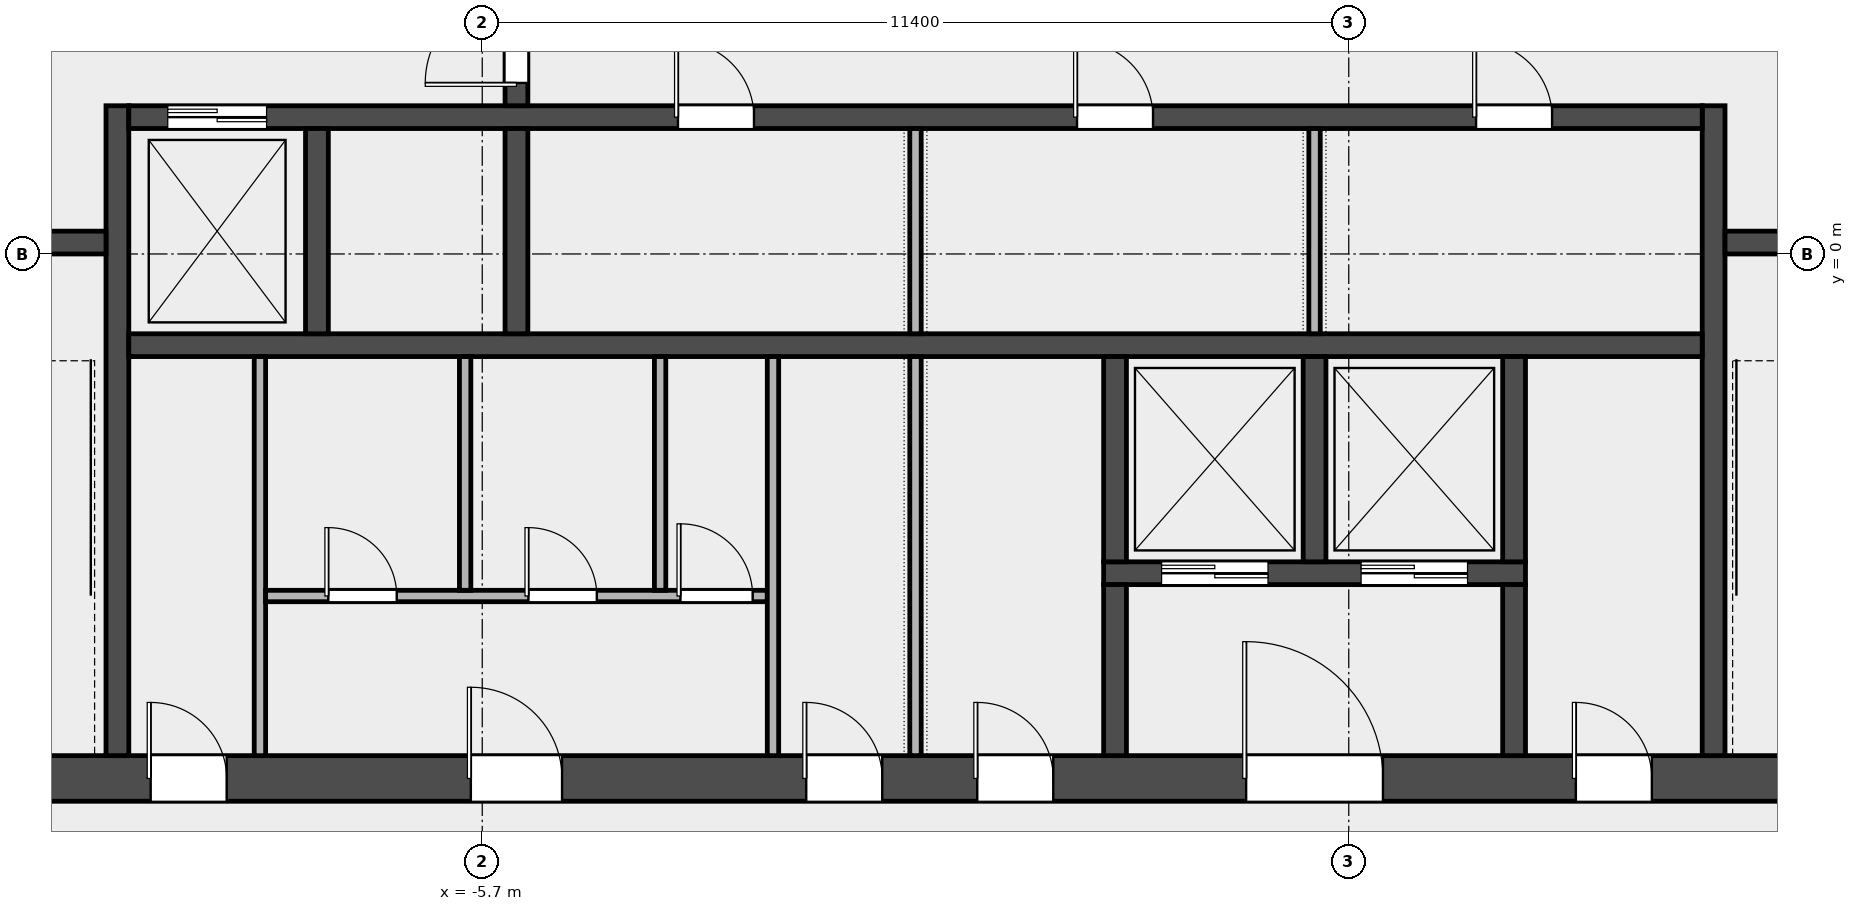
"""IFC4 building model, lengths in metres.
Left out: names, types, materials, properties, quantities, classifications, styles, units other than length and angle.
Written with IfcOpenShell. Run it as: python <this file> out.ifc"""

import sys

from ifc_helpers import new_model, si_unit, direction, frame, frame_2d, origin, place, context, subcontext, project, spatial, rectangle, extrude, element, fill, save


model = new_model("IFC4")
c1 = context("Model", 3, precision=1e-05, world=origin(), true_north=direction((0.0, 1.0)))
c2 = subcontext(c1, "Body", "Model", "MODEL_VIEW")
j1 = project(units=[si_unit("LENGTHUNIT", "METRE"), si_unit("PLANEANGLEUNIT", "RADIAN")], contexts=[c1])
p1 = place(None, origin())
s1 = spatial("IfcSite", under=j1, at=p1, CompositionType="ELEMENT")
p2 = place(p1, origin())
s2 = spatial("IfcBuilding", under=s1, at=p2, CompositionType="ELEMENT")
p3 = place(p2, frame((0.0, 0.0, 275.4)))
s3 = spatial("IfcBuildingStorey", under=s2, at=p3, CompositionType="ELEMENT", Elevation=275.4)
p4 = place(p3, frame((-14.4, -6.9, 0.0), z_axis=(0.0, 0.0, 1.0), x_axis=(1.0, 0.0, 0.0)))
e1 = element("IfcWall", 1, at=p4, inside=s3, PredefinedType="SHEAR", context=c2, shape_type="SweptSolid", body=[
    extrude(rectangle(XDim=28.8, YDim=0.6, at=frame_2d((14.4, 0.0))), origin(), (0.0, 0.0, 1.0), 3.7),
])
p5 = place(p4, frame((4.337, 0.0, 0.0)))
e2 = element("IfcOpeningElement", 2, at=p5, cuts=e1, PredefinedType="OPENING", context=c2, shape_type="SweptSolid", body=[
    extrude(rectangle(XDim=1.0, YDim=2.1, at=frame_2d((0.5, 1.05))), frame((0.0, 0.312, 0.0), z_axis=(0.0, -1.0, 0.0), x_axis=(1.0, 0.0, 0.0)), (0.0, 0.0, 1.0), 0.624),
])
p6 = place(p4, frame((8.55, 0.0, 0.0)))
e3 = element("IfcOpeningElement", 3, at=p6, cuts=e1, PredefinedType="OPENING", context=c2, shape_type="SweptSolid", body=[
    extrude(rectangle(XDim=1.2, YDim=2.1, at=frame_2d((0.6, 1.05))), frame((0.0, 0.312, 0.0), z_axis=(0.0, -1.0, 0.0), x_axis=(1.0, 0.0, 0.0)), (0.0, 0.0, 1.0), 0.624),
])
p7 = place(p4, frame((12.962, 0.0, 0.0)))
e4 = element("IfcOpeningElement", 4, at=p7, cuts=e1, PredefinedType="OPENING", context=c2, shape_type="SweptSolid", body=[
    extrude(rectangle(XDim=1.0, YDim=2.1, at=frame_2d((0.5, 1.05))), frame((0.0, 0.312, 0.0), z_axis=(0.0, -1.0, 0.0), x_axis=(1.0, 0.0, 0.0)), (0.0, 0.0, 1.0), 0.624),
])
p8 = place(p4, frame((15.212, 0.0, 0.0)))
e5 = element("IfcOpeningElement", 5, at=p8, cuts=e1, PredefinedType="OPENING", context=c2, shape_type="SweptSolid", body=[
    extrude(rectangle(XDim=1.0, YDim=2.1, at=frame_2d((0.5, 1.05))), frame((0.0, 0.312, 0.0), z_axis=(0.0, -1.0, 0.0), x_axis=(1.0, 0.0, 0.0)), (0.0, 0.0, 1.0), 0.624),
])
p9 = place(p4, frame((18.75, 0.0, 0.0)))
e6 = element("IfcOpeningElement", 6, at=p9, cuts=e1, PredefinedType="OPENING", context=c2, shape_type="SweptSolid", body=[
    extrude(rectangle(XDim=1.8, YDim=2.1, at=frame_2d((0.9, 1.05))), frame((0.0, 0.312, 0.0), z_axis=(0.0, -1.0, 0.0), x_axis=(1.0, 0.0, 0.0)), (0.0, 0.0, 1.0), 0.624),
])
p10 = place(p4, frame((23.087, 0.0, 0.0)))
e7 = element("IfcOpeningElement", 7, at=p10, cuts=e1, PredefinedType="OPENING", context=c2, shape_type="SweptSolid", body=[
    extrude(rectangle(XDim=1.0, YDim=2.1, at=frame_2d((0.5, 1.05))), frame((0.0, 0.312, 0.0), z_axis=(0.0, -1.0, 0.0), x_axis=(1.0, 0.0, 0.0)), (0.0, 0.0, 1.0), 0.624),
])
for number, where, z_axis, x_axis in (
    (8, (-10.5, -6.6, 0.0), (0.0, 0.0, 1.0), (0.0, 1.0, 0.0)),
    (9, (10.5, -6.6, 0.0), (0.0, 0.0, 1.0), (0.0, 1.0, 0.0)),
):
    element("IfcWall", number, at=place(p3, frame(where, z_axis=z_axis, x_axis=x_axis)), inside=s3, PredefinedType="SHEAR", context=c2, shape_type="SweptSolid", body=[
        extrude(rectangle(XDim=8.55, YDim=0.3, at=frame_2d((4.275, 0.0))), origin(), (0.0, 0.0, 1.0), 3.7),
    ])
p11 = place(p3, frame((-13.8, 0.15, 0.0), z_axis=(0.0, 0.0, 1.0), x_axis=(1.0, 0.0, 0.0)))
e10 = element("IfcWall", 10, at=p11, inside=s3, PredefinedType="SOLIDWALL", context=c2, shape_type="SweptSolid", body=[
    extrude(rectangle(XDim=3.15, YDim=0.3, at=frame_2d((1.575, 0.0))), origin(), (0.0, 0.0, 1.0), 3.7),
])
p12 = place(p11, frame((0.975, 0.0, 0.0)))
e11 = element("IfcOpeningElement", 11, at=p12, cuts=e10, PredefinedType="OPENING", context=c2, shape_type="SweptSolid", body=[
    extrude(rectangle(XDim=1.1, YDim=2.1, at=frame_2d((0.55, 1.05))), frame((0.0, 0.162, 0.0), z_axis=(0.0, -1.0, 0.0), x_axis=(1.0, 0.0, 0.0)), (0.0, 0.0, 1.0), 0.324),
])
p13 = place(p3, frame((10.65, 0.15, 0.0), z_axis=(0.0, 0.0, 1.0), x_axis=(1.0, 0.0, 0.0)))
e12 = element("IfcWall", 12, at=p13, inside=s3, PredefinedType="SOLIDWALL", context=c2, shape_type="SweptSolid", body=[
    extrude(rectangle(XDim=3.15, YDim=0.3, at=frame_2d((1.575, 0.0))), origin(), (0.0, 0.0, 1.0), 3.7),
])
p14 = place(p13, frame((1.025, 0.0, 0.0)))
e13 = element("IfcOpeningElement", 13, at=p14, cuts=e12, PredefinedType="OPENING", context=c2, shape_type="SweptSolid", body=[
    extrude(rectangle(XDim=1.1, YDim=2.1, at=frame_2d((0.55, 1.05))), frame((0.0, 0.162, 0.0), z_axis=(0.0, -1.0, 0.0), x_axis=(1.0, 0.0, 0.0)), (0.0, 0.0, 1.0), 0.324),
])
p15 = place(p3, frame((-10.35, -1.2, 0.0), z_axis=(0.0, 0.0, 1.0), x_axis=(1.0, 0.0, 0.0)))
e14 = element("IfcWall", 14, at=p15, inside=s3, PredefinedType="SOLIDWALL", context=c2, shape_type="SweptSolid", body=[
    extrude(rectangle(XDim=20.7, YDim=0.3, at=frame_2d((10.35, 0.0))), origin(), (0.0, 0.0, 1.0), 3.7),
])
p16 = place(p3, frame((-10.35, 1.8, 0.0), z_axis=(0.0, 0.0, 1.0), x_axis=(1.0, 0.0, 0.0)))
e15 = element("IfcWall", 15, at=p16, inside=s3, PredefinedType="SOLIDWALL", context=c2, shape_type="SweptSolid", body=[
    extrude(rectangle(XDim=20.7, YDim=0.3, at=frame_2d((10.35, 0.0))), origin(), (0.0, 0.0, 1.0), 3.7),
])
p17 = place(p16, frame((0.512, 0.0, 0.0)))
e16 = element("IfcOpeningElement", 16, at=p17, cuts=e15, PredefinedType="OPENING", context=c2, shape_type="SweptSolid", body=[
    extrude(rectangle(XDim=1.3, YDim=2.1, at=frame_2d((0.65, 1.05))), frame((0.0, 0.162, 0.0), z_axis=(0.0, -1.0, 0.0), x_axis=(1.0, 0.0, 0.0)), (0.0, 0.0, 1.0), 0.324),
])
p18 = place(p16, frame((7.225, 0.0, 0.0)))
e17 = element("IfcOpeningElement", 17, at=p18, cuts=e15, PredefinedType="OPENING", context=c2, shape_type="SweptSolid", body=[
    extrude(rectangle(XDim=1.0, YDim=2.1, at=frame_2d((0.5, 1.05))), frame((0.0, 0.162, 0.0), z_axis=(0.0, -1.0, 0.0), x_axis=(1.0, 0.0, 0.0)), (0.0, 0.0, 1.0), 0.324),
])
p19 = place(p16, frame((12.475, 0.0, 0.0)))
e18 = element("IfcOpeningElement", 18, at=p19, cuts=e15, PredefinedType="OPENING", context=c2, shape_type="SweptSolid", body=[
    extrude(rectangle(XDim=1.0, YDim=2.1, at=frame_2d((0.5, 1.05))), frame((0.0, 0.162, 0.0), z_axis=(0.0, -1.0, 0.0), x_axis=(1.0, 0.0, 0.0)), (0.0, 0.0, 1.0), 0.324),
])
p20 = place(p16, frame((17.725, 0.0, 0.0)))
e19 = element("IfcOpeningElement", 19, at=p20, cuts=e15, PredefinedType="OPENING", context=c2, shape_type="SweptSolid", body=[
    extrude(rectangle(XDim=1.0, YDim=2.1, at=frame_2d((0.5, 1.05))), frame((0.0, 0.162, 0.0), z_axis=(0.0, -1.0, 0.0), x_axis=(1.0, 0.0, 0.0)), (0.0, 0.0, 1.0), 0.324),
])
for number, where, z_axis, x_axis in (
    (20, (-7.875, -1.05, 0.0), (0.0, 0.0, 1.0), (0.0, 1.0, 0.0)),
    (21, (-5.25, -1.05, 0.0), (0.0, 0.0, 1.0), (0.0, 1.0, 0.0)),
):
    element("IfcWall", number, at=place(p3, frame(where, z_axis=z_axis, x_axis=x_axis)), inside=s3, PredefinedType="SOLIDWALL", context=c2, shape_type="SweptSolid", body=[
        extrude(rectangle(XDim=2.7, YDim=0.3, at=frame_2d((1.35, 0.0))), origin(), (0.0, 0.0, 1.0), 3.7),
    ])
p21 = place(p3, frame((-5.25, 1.95, 0.0), z_axis=(0.0, 0.0, 1.0), x_axis=(0.0, 1.0, 0.0)))
e22 = element("IfcWall", 22, at=p21, inside=s3, PredefinedType="SOLIDWALL", context=c2, shape_type="SweptSolid", body=[
    extrude(rectangle(XDim=3.3, YDim=0.3, at=frame_2d((1.65, 0.0))), origin(), (0.0, 0.0, 1.0), 3.7),
])
p22 = place(p21, frame((0.3, 0.0, 0.0)))
e23 = element("IfcOpeningElement", 23, at=p22, cuts=e22, PredefinedType="OPENING", context=c2, shape_type="SweptSolid", body=[
    extrude(rectangle(XDim=1.2, YDim=2.1, at=frame_2d((0.6, 1.05))), frame((0.0, 0.162, 0.0), z_axis=(0.0, -1.0, 0.0), x_axis=(1.0, 0.0, 0.0)), (0.0, 0.0, 1.0), 0.324),
])
p23 = place(p21, frame((1.8, 0.0, 0.0)))
e24 = element("IfcOpeningElement", 24, at=p23, cuts=e22, PredefinedType="OPENING", context=c2, shape_type="SweptSolid", body=[
    extrude(rectangle(XDim=1.2, YDim=2.1, at=frame_2d((0.6, 1.05))), frame((0.0, 0.162, 0.0), z_axis=(0.0, -1.0, 0.0), x_axis=(1.0, 0.0, 0.0)), (0.0, 0.0, 1.0), 0.324),
])
p24 = place(p3, frame((2.475, -4.2, 0.0), z_axis=(0.0, 0.0, 1.0), x_axis=(1.0, 0.0, 0.0)))
e25 = element("IfcWall", 25, at=p24, inside=s3, PredefinedType="SOLIDWALL", context=c2, shape_type="SweptSolid", body=[
    extrude(rectangle(XDim=5.55, YDim=0.3, at=frame_2d((2.775, 0.0))), origin(), (0.0, 0.0, 1.0), 3.7),
])
p25 = place(p24, frame((0.762, 0.0, 0.0)))
e26 = element("IfcOpeningElement", 26, at=p25, cuts=e25, PredefinedType="OPENING", context=c2, shape_type="SweptSolid", body=[
    extrude(rectangle(XDim=1.4, YDim=2.1, at=frame_2d((0.7, 1.05))), frame((0.0, 0.162, 0.0), z_axis=(0.0, -1.0, 0.0), x_axis=(1.0, 0.0, 0.0)), (0.0, 0.0, 1.0), 0.324),
])
p26 = place(p24, frame((3.387, 0.0, 0.0)))
e27 = element("IfcOpeningElement", 27, at=p26, cuts=e25, PredefinedType="OPENING", context=c2, shape_type="SweptSolid", body=[
    extrude(rectangle(XDim=1.4, YDim=2.1, at=frame_2d((0.7, 1.05))), frame((0.0, 0.162, 0.0), z_axis=(0.0, -1.0, 0.0), x_axis=(1.0, 0.0, 0.0)), (0.0, 0.0, 1.0), 0.324),
])
p27 = place(p3, frame((2.625, -4.05, 0.0), z_axis=(0.0, 0.0, 1.0), x_axis=(0.0, 1.0, 0.0)))
e28 = element("IfcWall", 28, at=p27, inside=s3, PredefinedType="SOLIDWALL", context=c2, shape_type="SweptSolid", body=[
    extrude(rectangle(XDim=2.7, YDim=0.3, at=frame_2d((1.35, 0.0))), origin(), (0.0, 0.0, 1.0), 3.7),
])
p28 = place(p3, frame((2.625, -6.6, 0.0), z_axis=(0.0, 0.0, 1.0), x_axis=(0.0, 1.0, 0.0)))
e29 = element("IfcWall", 29, at=p28, inside=s3, PredefinedType="SOLIDWALL", context=c2, shape_type="SweptSolid", body=[
    extrude(rectangle(XDim=2.25, YDim=0.3, at=frame_2d((1.125, 0.0))), origin(), (0.0, 0.0, 1.0), 3.7),
])
for number, where, z_axis, x_axis in (
    (30, (5.25, -4.05, 0.0), (0.0, 0.0, 1.0), (0.0, 1.0, 0.0)),
    (31, (7.875, -4.05, 0.0), (0.0, 0.0, 1.0), (0.0, 1.0, 0.0)),
):
    element("IfcWall", number, at=place(p3, frame(where, z_axis=z_axis, x_axis=x_axis)), inside=s3, PredefinedType="SOLIDWALL", context=c2, shape_type="SweptSolid", body=[
        extrude(rectangle(XDim=2.7, YDim=0.3, at=frame_2d((1.35, 0.0))), origin(), (0.0, 0.0, 1.0), 3.7),
    ])
p29 = place(p3, frame((7.875, -6.6, 0.0), z_axis=(0.0, 0.0, 1.0), x_axis=(0.0, 1.0, 0.0)))
e32 = element("IfcWall", 32, at=p29, inside=s3, PredefinedType="SOLIDWALL", context=c2, shape_type="SweptSolid", body=[
    extrude(rectangle(XDim=2.25, YDim=0.3, at=frame_2d((1.125, 0.0))), origin(), (0.0, 0.0, 1.0), 3.7),
])
p30 = place(p3, frame((-8.625, -6.6, 0.0), z_axis=(0.0, 0.0, 1.0), x_axis=(0.0, 1.0, 0.0)))
e33 = element("IfcWall", 33, at=p30, inside=s3, PredefinedType="PARTITIONING", context=c2, shape_type="SweptSolid", body=[
    extrude(rectangle(XDim=5.25, YDim=0.15, at=frame_2d((2.625, 0.0))), origin(), (0.0, 0.0, 1.0), 3.7),
])
p31 = place(p3, frame((-8.55, -4.5, 0.0), z_axis=(0.0, 0.0, 1.0), x_axis=(1.0, 0.0, 0.0)))
e34 = element("IfcWall", 34, at=p31, inside=s3, PredefinedType="PARTITIONING", context=c2, shape_type="SweptSolid", body=[
    extrude(rectangle(XDim=6.6, YDim=0.15, at=frame_2d((3.3, 0.0))), origin(), (0.0, 0.0, 1.0), 3.7),
])
p32 = place(p31, frame((0.825, 0.0, 0.0)))
e35 = element("IfcOpeningElement", 35, at=p32, cuts=e34, PredefinedType="OPENING", context=c2, shape_type="SweptSolid", body=[
    extrude(rectangle(XDim=0.9, YDim=2.1, at=frame_2d((0.45, 1.05))), frame((0.0, 0.087, 0.0), z_axis=(0.0, -1.0, 0.0), x_axis=(1.0, 0.0, 0.0)), (0.0, 0.0, 1.0), 0.174),
])
p33 = place(p31, frame((3.458, 0.0, 0.0)))
e36 = element("IfcOpeningElement", 36, at=p33, cuts=e34, PredefinedType="OPENING", context=c2, shape_type="SweptSolid", body=[
    extrude(rectangle(XDim=0.9, YDim=2.1, at=frame_2d((0.45, 1.05))), frame((0.0, 0.087, 0.0), z_axis=(0.0, -1.0, 0.0), x_axis=(1.0, 0.0, 0.0)), (0.0, 0.0, 1.0), 0.174),
])
p34 = place(p31, frame((5.458, 0.0, 0.0)))
e37 = element("IfcOpeningElement", 37, at=p34, cuts=e34, PredefinedType="OPENING", context=c2, shape_type="SweptSolid", body=[
    extrude(rectangle(XDim=0.95, YDim=2.1, at=frame_2d((0.475, 1.05))), frame((0.0, 0.087, 0.0), z_axis=(0.0, -1.0, 0.0), x_axis=(1.0, 0.0, 0.0)), (0.0, 0.0, 1.0), 0.174),
])
for number, where, z_axis, x_axis in (
    (38, (-5.925, -4.425, 0.0), (0.0, 0.0, 1.0), (0.0, 1.0, 0.0)),
    (39, (-3.36, -4.425, 0.0), (0.0, 0.0, 1.0), (0.0, 1.0, 0.0)),
):
    element("IfcWall", number, at=place(p3, frame(where, z_axis=z_axis, x_axis=x_axis)), inside=s3, PredefinedType="PARTITIONING", context=c2, shape_type="SweptSolid", body=[
        extrude(rectangle(XDim=3.075, YDim=0.15, at=frame_2d((1.538, 0.0))), origin(), (0.0, 0.0, 1.0), 3.7),
    ])
for number, where, z_axis, x_axis in (
    (40, (-1.875, -6.6, 0.0), (0.0, 0.0, 1.0), (0.0, 1.0, 0.0)),
    (41, (0.0, -6.6, 0.0), (0.0, 0.0, 1.0), (0.0, 1.0, 0.0)),
):
    element("IfcWall", number, at=place(p3, frame(where, z_axis=z_axis, x_axis=x_axis)), inside=s3, PredefinedType="PARTITIONING", context=c2, shape_type="SweptSolid", body=[
        extrude(rectangle(XDim=5.25, YDim=0.15, at=frame_2d((2.625, 0.0))), origin(), (0.0, 0.0, 1.0), 3.7),
    ])
for number, where, z_axis, x_axis in (
    (42, (0.0, -1.05, 0.0), (0.0, 0.0, 1.0), (0.0, 1.0, 0.0)),
    (43, (5.25, -1.05, 0.0), (0.0, 0.0, 1.0), (0.0, 1.0, 0.0)),
):
    element("IfcWall", number, at=place(p3, frame(where, z_axis=z_axis, x_axis=x_axis)), inside=s3, PredefinedType="PARTITIONING", context=c2, shape_type="SweptSolid", body=[
        extrude(rectangle(XDim=2.7, YDim=0.15, at=frame_2d((1.35, 0.0))), origin(), (0.0, 0.0, 1.0), 3.7),
    ])
p35 = place(p22, origin())
e44 = element("IfcDoor", 44, at=p35, inside=s3, OperationType="SINGLE_SWING_LEFT", PredefinedType="DOOR", context=c2, shape_type="SweptSolid", body=[
    extrude(rectangle(XDim=1.2, YDim=2.1, at=frame_2d((0.6, 1.05))), frame((0.0, 0.025, 0.0), z_axis=(0.0, -1.0, 0.0), x_axis=(1.0, 0.0, 0.0)), (0.0, 0.0, 1.0), 0.05),
])
fill(e23, e44)
p36 = place(p17, origin())
e45 = element("IfcDoor", 45, at=p36, inside=s3, OperationType="DOUBLE_DOOR_SLIDING", PredefinedType="DOOR", context=c2, shape_type="SweptSolid", body=[
    extrude(rectangle(XDim=1.3, YDim=2.1, at=frame_2d((0.65, 1.05))), frame((0.0, 0.025, 0.0), z_axis=(0.0, -1.0, 0.0), x_axis=(1.0, 0.0, 0.0)), (0.0, 0.0, 1.0), 0.05),
])
fill(e16, e45)
p37 = place(p25, origin())
e46 = element("IfcDoor", 46, at=p37, inside=s3, OperationType="DOUBLE_DOOR_SLIDING", PredefinedType="DOOR", context=c2, shape_type="SweptSolid", body=[
    extrude(rectangle(XDim=1.4, YDim=2.1, at=frame_2d((0.7, 1.05))), frame((0.0, 0.025, 0.0), z_axis=(0.0, -1.0, 0.0), x_axis=(1.0, 0.0, 0.0)), (0.0, 0.0, 1.0), 0.05),
])
fill(e26, e46)
p38 = place(p26, origin())
e47 = element("IfcDoor", 47, at=p38, inside=s3, OperationType="DOUBLE_DOOR_SLIDING", PredefinedType="DOOR", context=c2, shape_type="SweptSolid", body=[
    extrude(rectangle(XDim=1.4, YDim=2.1, at=frame_2d((0.7, 1.05))), frame((0.0, 0.025, 0.0), z_axis=(0.0, -1.0, 0.0), x_axis=(1.0, 0.0, 0.0)), (0.0, 0.0, 1.0), 0.05),
])
fill(e27, e47)
p39 = place(p5, origin())
e48 = element("IfcDoor", 48, at=p39, inside=s3, OperationType="SINGLE_SWING_LEFT", PredefinedType="DOOR", context=c2, shape_type="SweptSolid", body=[
    extrude(rectangle(XDim=1.0, YDim=2.1, at=frame_2d((0.5, 1.05))), frame((0.0, 0.025, 0.0), z_axis=(0.0, -1.0, 0.0), x_axis=(1.0, 0.0, 0.0)), (0.0, 0.0, 1.0), 0.05),
])
fill(e2, e48)
p40 = place(p6, origin())
e49 = element("IfcDoor", 49, at=p40, inside=s3, OperationType="SINGLE_SWING_LEFT", PredefinedType="DOOR", context=c2, shape_type="SweptSolid", body=[
    extrude(rectangle(XDim=1.2, YDim=2.1, at=frame_2d((0.6, 1.05))), frame((0.0, 0.025, 0.0), z_axis=(0.0, -1.0, 0.0), x_axis=(1.0, 0.0, 0.0)), (0.0, 0.0, 1.0), 0.05),
])
fill(e3, e49)
p41 = place(p32, origin())
e50 = element("IfcDoor", 50, at=p41, inside=s3, OperationType="SINGLE_SWING_LEFT", PredefinedType="DOOR", context=c2, shape_type="SweptSolid", body=[
    extrude(rectangle(XDim=0.9, YDim=2.1, at=frame_2d((0.45, 1.05))), frame((0.0, 0.025, 0.0), z_axis=(0.0, -1.0, 0.0), x_axis=(1.0, 0.0, 0.0)), (0.0, 0.0, 1.0), 0.05),
])
fill(e35, e50)
p42 = place(p33, origin())
e51 = element("IfcDoor", 51, at=p42, inside=s3, OperationType="SINGLE_SWING_LEFT", PredefinedType="DOOR", context=c2, shape_type="SweptSolid", body=[
    extrude(rectangle(XDim=0.9, YDim=2.1, at=frame_2d((0.45, 1.05))), frame((0.0, 0.025, 0.0), z_axis=(0.0, -1.0, 0.0), x_axis=(1.0, 0.0, 0.0)), (0.0, 0.0, 1.0), 0.05),
])
fill(e36, e51)
p43 = place(p34, origin())
e52 = element("IfcDoor", 52, at=p43, inside=s3, OperationType="SINGLE_SWING_LEFT", PredefinedType="DOOR", context=c2, shape_type="SweptSolid", body=[
    extrude(rectangle(XDim=0.95, YDim=2.1, at=frame_2d((0.475, 1.05))), frame((0.0, 0.025, 0.0), z_axis=(0.0, -1.0, 0.0), x_axis=(1.0, 0.0, 0.0)), (0.0, 0.0, 1.0), 0.05),
])
fill(e37, e52)
p44 = place(p7, origin())
e53 = element("IfcDoor", 53, at=p44, inside=s3, OperationType="SINGLE_SWING_LEFT", PredefinedType="DOOR", context=c2, shape_type="SweptSolid", body=[
    extrude(rectangle(XDim=1.0, YDim=2.1, at=frame_2d((0.5, 1.05))), frame((0.0, 0.025, 0.0), z_axis=(0.0, -1.0, 0.0), x_axis=(1.0, 0.0, 0.0)), (0.0, 0.0, 1.0), 0.05),
])
fill(e4, e53)
p45 = place(p8, origin())
e54 = element("IfcDoor", 54, at=p45, inside=s3, OperationType="SINGLE_SWING_LEFT", PredefinedType="DOOR", context=c2, shape_type="SweptSolid", body=[
    extrude(rectangle(XDim=1.0, YDim=2.1, at=frame_2d((0.5, 1.05))), frame((0.0, 0.025, 0.0), z_axis=(0.0, -1.0, 0.0), x_axis=(1.0, 0.0, 0.0)), (0.0, 0.0, 1.0), 0.05),
])
fill(e5, e54)
p46 = place(p9, origin())
e55 = element("IfcDoor", 55, at=p46, inside=s3, OperationType="DOUBLE_DOOR_SINGLE_SWING", PredefinedType="DOOR", context=c2, shape_type="SweptSolid", body=[
    extrude(rectangle(XDim=1.8, YDim=2.1, at=frame_2d((0.9, 1.05))), frame((0.0, 0.025, 0.0), z_axis=(0.0, -1.0, 0.0), x_axis=(1.0, 0.0, 0.0)), (0.0, 0.0, 1.0), 0.05),
])
fill(e6, e55)
p47 = place(p10, origin())
e56 = element("IfcDoor", 56, at=p47, inside=s3, OperationType="SINGLE_SWING_LEFT", PredefinedType="DOOR", context=c2, shape_type="SweptSolid", body=[
    extrude(rectangle(XDim=1.0, YDim=2.1, at=frame_2d((0.5, 1.05))), frame((0.0, 0.025, 0.0), z_axis=(0.0, -1.0, 0.0), x_axis=(1.0, 0.0, 0.0)), (0.0, 0.0, 1.0), 0.05),
])
fill(e7, e56)
p48 = place(p18, origin())
e57 = element("IfcDoor", 57, at=p48, inside=s3, OperationType="SINGLE_SWING_LEFT", PredefinedType="DOOR", context=c2, shape_type="SweptSolid", body=[
    extrude(rectangle(XDim=1.0, YDim=2.1, at=frame_2d((0.5, 1.05))), frame((0.0, 0.025, 0.0), z_axis=(0.0, -1.0, 0.0), x_axis=(1.0, 0.0, 0.0)), (0.0, 0.0, 1.0), 0.05),
])
fill(e17, e57)
p49 = place(p19, origin())
e58 = element("IfcDoor", 58, at=p49, inside=s3, OperationType="SINGLE_SWING_LEFT", PredefinedType="DOOR", context=c2, shape_type="SweptSolid", body=[
    extrude(rectangle(XDim=1.0, YDim=2.1, at=frame_2d((0.5, 1.05))), frame((0.0, 0.025, 0.0), z_axis=(0.0, -1.0, 0.0), x_axis=(1.0, 0.0, 0.0)), (0.0, 0.0, 1.0), 0.05),
])
fill(e18, e58)
p50 = place(p20, origin())
e59 = element("IfcDoor", 59, at=p50, inside=s3, OperationType="SINGLE_SWING_LEFT", PredefinedType="DOOR", context=c2, shape_type="SweptSolid", body=[
    extrude(rectangle(XDim=1.0, YDim=2.1, at=frame_2d((0.5, 1.05))), frame((0.0, 0.025, 0.0), z_axis=(0.0, -1.0, 0.0), x_axis=(1.0, 0.0, 0.0)), (0.0, 0.0, 1.0), 0.05),
])
fill(e19, e59)
save(model, sys.argv[1])
